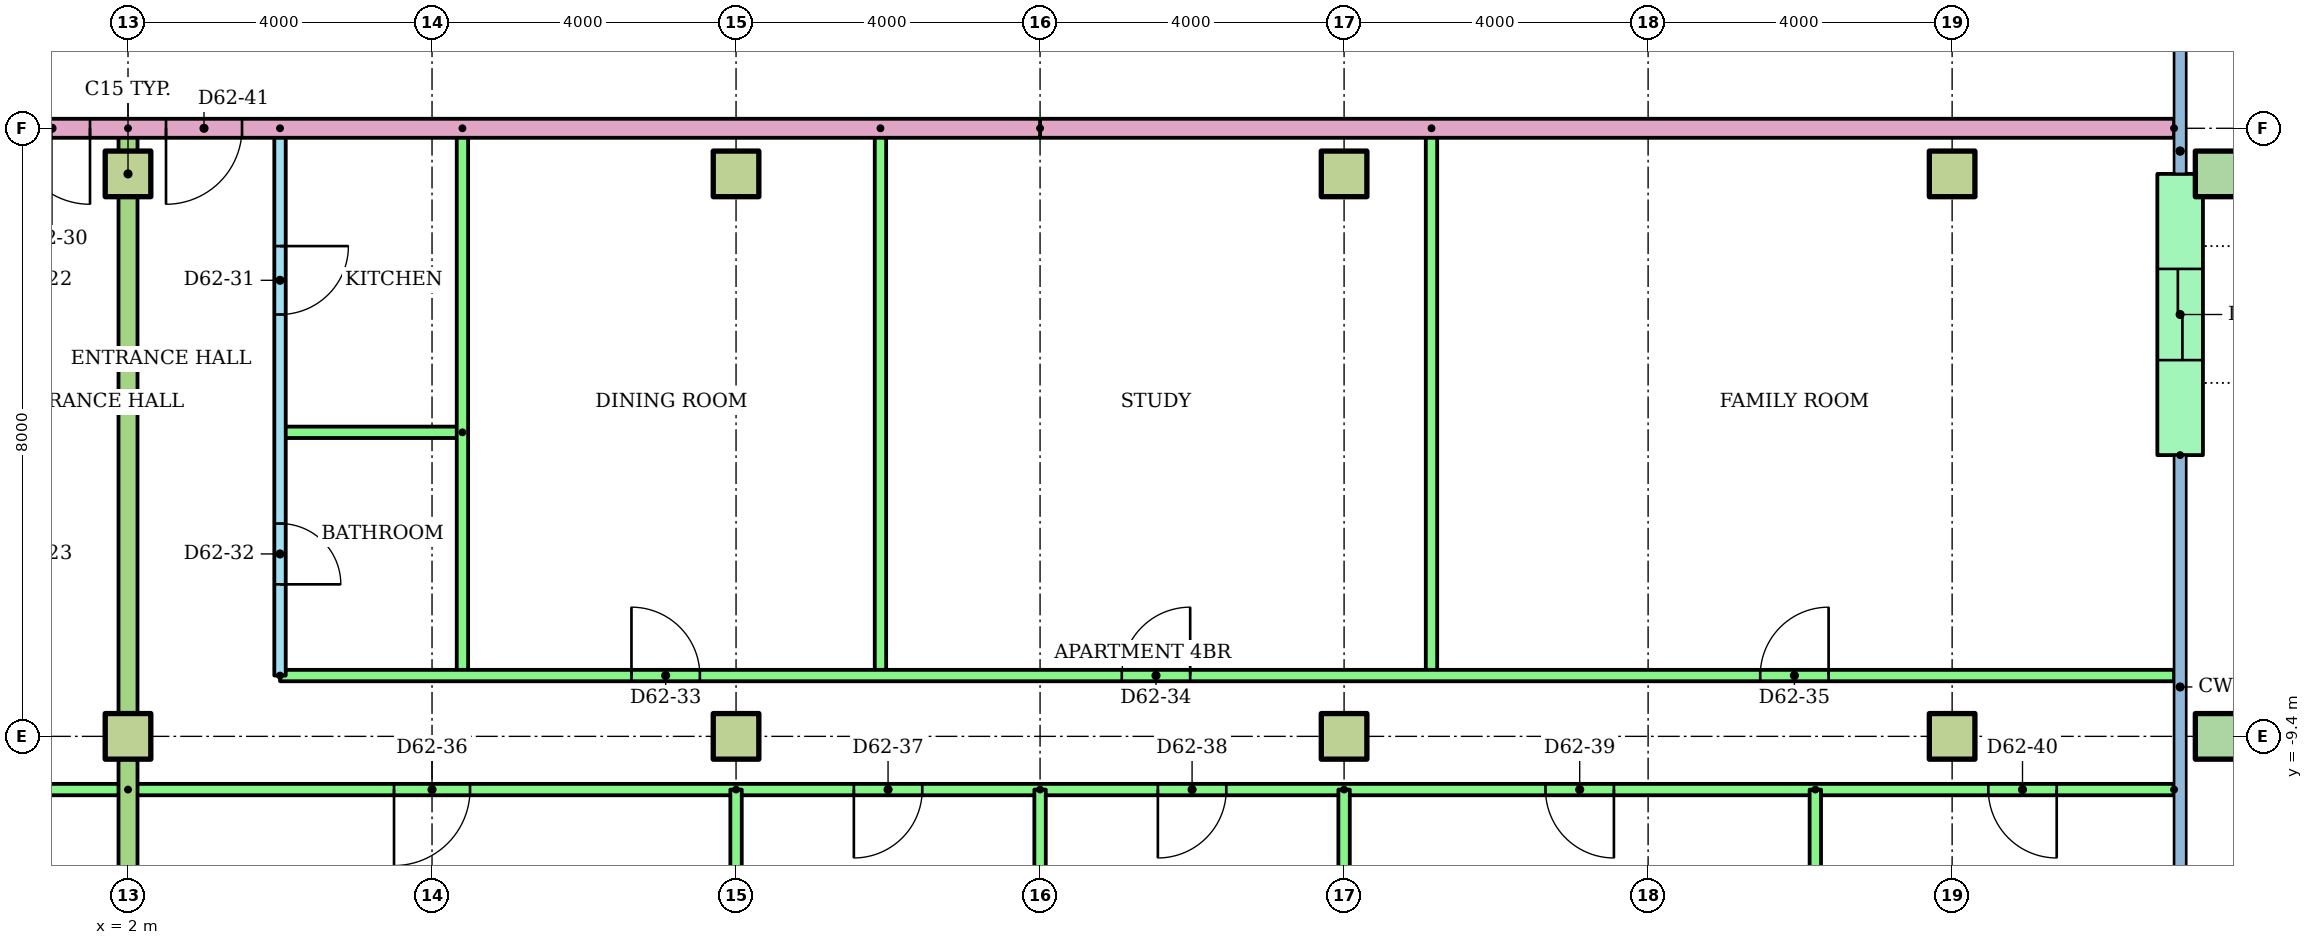
"""IFC4 building model, lengths in metres.
Left out: names, types, materials, properties, quantities, classifications, styles, units other than length and angle.
Written with IfcOpenShell. Run it as: python <this file> out.ifc"""

import sys

from ifc_helpers import new_model, si_unit, direction, frame, frame_2d, origin, origin_2d, place, context, subcontext, project, spatial, rectangle, hollow_rectangle, extrude, element, fill, save


model = new_model("IFC4")
c1 = context("Model", 3, precision=1e-05, world=origin(), true_north=direction((0.0, 1.0)))
c2 = subcontext(c1, "Body", "Model", "MODEL_VIEW")
j1 = project(units=[si_unit("LENGTHUNIT", "METRE"), si_unit("PLANEANGLEUNIT", "RADIAN")], contexts=[c1])
p1 = place(None, origin())
s1 = spatial("IfcSite", under=j1, at=p1, CompositionType="ELEMENT")
p2 = place(p1, origin())
s2 = spatial("IfcBuilding", under=s1, at=p2, CompositionType="ELEMENT")
p3 = place(p2, frame((0.0, 0.0, 236.4)))
s3 = spatial("IfcBuildingStorey", under=s2, at=p3, CompositionType="ELEMENT", Elevation=236.4)
for number, where in (
    (1, (2.0, -9.4, 0.0)),
    (2, (10.0, -9.4, 0.0)),
    (3, (18.0, -9.4, 0.0)),
    (4, (26.0, -9.4, 0.0)),
):
    element("IfcColumn", number, at=place(p3, frame(where)), inside=s3, PredefinedType="COLUMN", context=c2, shape_type="SweptSolid", body=[
        extrude(rectangle(XDim=0.6, YDim=0.6, at=origin_2d()), origin(), (0.0, 0.0, 1.0), 3.2),
    ])
p4 = place(p3, frame((29.5, -9.4, 0.0)))
e5 = element("IfcColumn", 5, at=p4, inside=s3, PredefinedType="COLUMN", context=c2, shape_type="SweptSolid", body=[
    extrude(hollow_rectangle(XDim=0.6, YDim=0.6, WallThickness=0.03, at=origin_2d()), origin(), (0.0, 0.0, 1.0), 3.2),
])
for number, where in (
    (6, (2.0, -2.0, 0.0)),
    (7, (10.0, -2.0, 0.0)),
    (8, (18.0, -2.0, 0.0)),
    (9, (26.0, -2.0, 0.0)),
):
    element("IfcColumn", number, at=place(p3, frame(where)), inside=s3, PredefinedType="COLUMN", context=c2, shape_type="SweptSolid", body=[
        extrude(rectangle(XDim=0.6, YDim=0.6, at=origin_2d()), origin(), (0.0, 0.0, 1.0), 3.2),
    ])
p5 = place(p3, frame((29.5, -2.0, 0.0)))
e10 = element("IfcColumn", 10, at=p5, inside=s3, PredefinedType="COLUMN", context=c2, shape_type="SweptSolid", body=[
    extrude(hollow_rectangle(XDim=0.6, YDim=0.6, WallThickness=0.03, at=origin_2d()), origin(), (0.0, 0.0, 1.0), 3.2),
])
p6 = place(p3, frame((29.0, -5.7, 0.0), z_axis=(0.0, 0.0, 1.0), x_axis=(0.0, 1.0, 0.0)))
e11 = element("IfcWall", 11, at=p6, inside=s3, PredefinedType="STANDARD", context=c2, shape_type="SweptSolid", body=[
    extrude(rectangle(XDim=3.7, YDim=0.6, at=frame_2d((1.85, 0.0))), origin(), (0.0, 0.0, 1.0), 2.8),
])
p7 = place(p6, frame((1.25, 0.0, 0.0)))
e12 = element("IfcOpeningElement", 12, at=p7, cuts=e11, PredefinedType="OPENING", context=c2, shape_type="SweptSolid", body=[
    extrude(rectangle(XDim=1.2, YDim=2.1, at=frame_2d((0.6, 1.05))), frame((0.0, 0.31, 0.0), z_axis=(0.0, -1.0, 0.0), x_axis=(1.0, 0.0, 0.0)), (0.0, 0.0, 1.0), 0.62),
])
p8 = place(p3, frame((2.0, -10.1, 0.0), z_axis=(0.0, 0.0, 1.0), x_axis=(-1.0, 0.0, 0.0)))
e13 = element("IfcWall", 13, at=p8, inside=s3, PredefinedType="PARTITIONING", context=c2, shape_type="SweptSolid", body=[
    extrude(rectangle(XDim=16.0, YDim=0.15, at=frame_2d((8.0, 0.0))), origin(), (0.0, 0.0, 1.0), 2.4),
])
p9 = place(p8, frame((13.55, 0.0, 0.0)))
e14 = element("IfcOpeningElement", 14, at=p9, cuts=e13, PredefinedType="OPENING", context=c2, shape_type="SweptSolid", body=[
    extrude(rectangle(XDim=0.9, YDim=2.1, at=frame_2d((0.45, 1.05))), frame((0.0, 0.085, 0.0), z_axis=(0.0, -1.0, 0.0), x_axis=(1.0, 0.0, 0.0)), (0.0, 0.0, 1.0), 0.17),
])
p10 = place(p8, frame((9.55, 0.0, 0.0)))
e15 = element("IfcOpeningElement", 15, at=p10, cuts=e13, PredefinedType="OPENING", context=c2, shape_type="SweptSolid", body=[
    extrude(rectangle(XDim=0.9, YDim=2.1, at=frame_2d((0.45, 1.05))), frame((0.0, 0.085, 0.0), z_axis=(0.0, -1.0, 0.0), x_axis=(1.0, 0.0, 0.0)), (0.0, 0.0, 1.0), 0.17),
])
p11 = place(p8, frame((3.5, 0.0, 0.0)))
e16 = element("IfcOpeningElement", 16, at=p11, cuts=e13, PredefinedType="OPENING", context=c2, shape_type="SweptSolid", body=[
    extrude(rectangle(XDim=1.0, YDim=2.1, at=frame_2d((0.5, 1.05))), frame((0.0, 0.085, 0.0), z_axis=(0.0, -1.0, 0.0), x_axis=(1.0, 0.0, 0.0)), (0.0, 0.0, 1.0), 0.17),
])
p12 = place(p3, frame((4.0, -1.4, 0.0), z_axis=(0.0, 0.0, 1.0), x_axis=(0.0, -1.0, 0.0)))
e17 = element("IfcWall", 17, at=p12, inside=s3, PredefinedType="PARTITIONING", context=c2, shape_type="SweptSolid", body=[
    extrude(rectangle(XDim=7.2, YDim=0.15, at=frame_2d((3.6, 0.0))), origin(), (0.0, 0.0, 1.0), 2.4),
])
p13 = place(p12, frame((1.55, 0.0, 0.0)))
e18 = element("IfcOpeningElement", 18, at=p13, cuts=e17, PredefinedType="OPENING", context=c2, shape_type="SweptSolid", body=[
    extrude(rectangle(XDim=0.9, YDim=2.1, at=frame_2d((0.45, 1.05))), frame((0.0, 0.085, 0.0), z_axis=(0.0, -1.0, 0.0), x_axis=(1.0, 0.0, 0.0)), (0.0, 0.0, 1.0), 0.17),
])
p14 = place(p12, frame((5.2, 0.0, 0.0)))
e19 = element("IfcOpeningElement", 19, at=p14, cuts=e17, PredefinedType="OPENING", context=c2, shape_type="SweptSolid", body=[
    extrude(rectangle(XDim=0.8, YDim=2.1, at=frame_2d((0.4, 1.05))), frame((0.0, 0.085, 0.0), z_axis=(0.0, -1.0, 0.0), x_axis=(1.0, 0.0, 0.0)), (0.0, 0.0, 1.0), 0.17),
])
p15 = place(p3, frame((6.4, -5.4, 0.0), z_axis=(0.0, 0.0, 1.0), x_axis=(-1.0, 0.0, 0.0)))
e20 = element("IfcWall", 20, at=p15, inside=s3, PredefinedType="PARTITIONING", context=c2, shape_type="SweptSolid", body=[
    extrude(rectangle(XDim=2.4, YDim=0.15, at=frame_2d((1.2, 0.0))), origin(), (0.0, 0.0, 1.0), 2.4),
])
for number, where, z_axis, x_axis in (
    (21, (6.4, -1.4, 0.0), (0.0, 0.0, 1.0), (0.0, -1.0, 0.0)),
    (22, (11.9, -1.4, 0.0), (0.0, 0.0, 1.0), (0.0, -1.0, 0.0)),
    (23, (19.15, -1.4, 0.0), (0.0, 0.0, 1.0), (0.0, -1.0, 0.0)),
):
    element("IfcWall", number, at=place(p3, frame(where, z_axis=z_axis, x_axis=x_axis)), inside=s3, PredefinedType="PARTITIONING", context=c2, shape_type="SweptSolid", body=[
        extrude(rectangle(XDim=7.2, YDim=0.15, at=frame_2d((3.6, 0.0))), origin(), (0.0, 0.0, 1.0), 2.4),
    ])
p16 = place(p3, frame((4.0, -8.6, 0.0)))
e24 = element("IfcWall", 24, at=p16, inside=s3, PredefinedType="PARTITIONING", context=c2, shape_type="SweptSolid", body=[
    extrude(rectangle(XDim=24.92, YDim=0.15, at=frame_2d((12.46, 0.0))), origin(), (0.0, 0.0, 1.0), 2.4),
])
p17 = place(p16, frame((4.624, 0.0, 0.0)))
e25 = element("IfcOpeningElement", 25, at=p17, cuts=e24, PredefinedType="OPENING", context=c2, shape_type="SweptSolid", body=[
    extrude(rectangle(XDim=0.9, YDim=2.1, at=frame_2d((0.45, 1.05))), frame((0.0, 0.085, 0.0), z_axis=(0.0, -1.0, 0.0), x_axis=(1.0, 0.0, 0.0)), (0.0, 0.0, 1.0), 0.17),
])
p18 = place(p16, frame((11.075, 0.0, 0.0)))
e26 = element("IfcOpeningElement", 26, at=p18, cuts=e24, PredefinedType="OPENING", context=c2, shape_type="SweptSolid", body=[
    extrude(rectangle(XDim=0.9, YDim=2.1, at=frame_2d((0.45, 1.05))), frame((0.0, 0.085, 0.0), z_axis=(0.0, -1.0, 0.0), x_axis=(1.0, 0.0, 0.0)), (0.0, 0.0, 1.0), 0.17),
])
p19 = place(p16, frame((19.475, 0.0, 0.0)))
e27 = element("IfcOpeningElement", 27, at=p19, cuts=e24, PredefinedType="OPENING", context=c2, shape_type="SweptSolid", body=[
    extrude(rectangle(XDim=0.9, YDim=2.1, at=frame_2d((0.45, 1.05))), frame((0.0, 0.085, 0.0), z_axis=(0.0, -1.0, 0.0), x_axis=(1.0, 0.0, 0.0)), (0.0, 0.0, 1.0), 0.17),
])
p20 = place(p3, frame((28.92, -10.1, 0.0), z_axis=(0.0, 0.0, 1.0), x_axis=(-1.0, 0.0, 0.0)))
e28 = element("IfcWall", 28, at=p20, inside=s3, PredefinedType="PARTITIONING", context=c2, shape_type="SweptSolid", body=[
    extrude(rectangle(XDim=26.92, YDim=0.15, at=frame_2d((13.46, 0.0))), origin(), (0.0, 0.0, 1.0), 2.4),
])
p21 = place(p20, frame((22.42, 0.0, 0.0)))
e29 = element("IfcOpeningElement", 29, at=p21, cuts=e28, PredefinedType="OPENING", context=c2, shape_type="SweptSolid", body=[
    extrude(rectangle(XDim=1.0, YDim=2.1, at=frame_2d((0.5, 1.05))), frame((0.0, 0.085, 0.0), z_axis=(0.0, -1.0, 0.0), x_axis=(1.0, 0.0, 0.0)), (0.0, 0.0, 1.0), 0.17),
])
p22 = place(p20, frame((16.47, 0.0, 0.0)))
e30 = element("IfcOpeningElement", 30, at=p22, cuts=e28, PredefinedType="OPENING", context=c2, shape_type="SweptSolid", body=[
    extrude(rectangle(XDim=0.9, YDim=2.1, at=frame_2d((0.45, 1.05))), frame((0.0, 0.085, 0.0), z_axis=(0.0, -1.0, 0.0), x_axis=(1.0, 0.0, 0.0)), (0.0, 0.0, 1.0), 0.17),
])
p23 = place(p20, frame((12.47, 0.0, 0.0)))
e31 = element("IfcOpeningElement", 31, at=p23, cuts=e28, PredefinedType="OPENING", context=c2, shape_type="SweptSolid", body=[
    extrude(rectangle(XDim=0.9, YDim=2.1, at=frame_2d((0.45, 1.05))), frame((0.0, 0.085, 0.0), z_axis=(0.0, -1.0, 0.0), x_axis=(1.0, 0.0, 0.0)), (0.0, 0.0, 1.0), 0.17),
])
p24 = place(p20, frame((7.37, 0.0, 0.0)))
e32 = element("IfcOpeningElement", 32, at=p24, cuts=e28, PredefinedType="OPENING", context=c2, shape_type="SweptSolid", body=[
    extrude(rectangle(XDim=0.9, YDim=2.1, at=frame_2d((0.45, 1.05))), frame((0.0, 0.085, 0.0), z_axis=(0.0, -1.0, 0.0), x_axis=(1.0, 0.0, 0.0)), (0.0, 0.0, 1.0), 0.17),
])
p25 = place(p20, frame((1.544, 0.0, 0.0)))
e33 = element("IfcOpeningElement", 33, at=p25, cuts=e28, PredefinedType="OPENING", context=c2, shape_type="SweptSolid", body=[
    extrude(rectangle(XDim=0.9, YDim=2.1, at=frame_2d((0.45, 1.05))), frame((0.0, 0.085, 0.0), z_axis=(0.0, -1.0, 0.0), x_axis=(1.0, 0.0, 0.0)), (0.0, 0.0, 1.0), 0.17),
])
p26 = place(p3, frame((10.0, -10.1, 0.0), z_axis=(0.0, 0.0, 1.0), x_axis=(0.0, -1.0, 0.0)))
e34 = element("IfcWall", 34, at=p26, inside=s3, PredefinedType="PARTITIONING", context=c2, shape_type="SweptSolid", body=[
    extrude(rectangle(XDim=6.41, YDim=0.15, at=frame_2d((3.205, 0.0))), origin(), (0.0, 0.0, 1.0), 2.4),
])
p27 = place(p3, frame((14.0, -10.1, 0.0), z_axis=(0.0, 0.0, 1.0), x_axis=(0.0, -1.0, 0.0)))
e35 = element("IfcWall", 35, at=p27, inside=s3, PredefinedType="PARTITIONING", context=c2, shape_type="SweptSolid", body=[
    extrude(rectangle(XDim=6.421, YDim=0.15, at=frame_2d((3.21, 0.0))), origin(), (0.0, 0.0, 1.0), 2.4),
])
p28 = place(p3, frame((18.0, -10.1, 0.0), z_axis=(0.0, 0.0, 1.0), x_axis=(0.0, -1.0, 0.0)))
e36 = element("IfcWall", 36, at=p28, inside=s3, PredefinedType="PARTITIONING", context=c2, shape_type="SweptSolid", body=[
    extrude(rectangle(XDim=6.41, YDim=0.15, at=frame_2d((3.205, 0.0))), origin(), (0.0, 0.0, 1.0), 2.4),
])
p29 = place(p3, frame((24.2, -10.1, 0.0), z_axis=(0.0, 0.0, 1.0), x_axis=(0.0, -1.0, 0.0)))
e37 = element("IfcWall", 37, at=p29, inside=s3, PredefinedType="PARTITIONING", context=c2, shape_type="SweptSolid", body=[
    extrude(rectangle(XDim=4.62, YDim=0.15, at=frame_2d((2.31, 0.0))), origin(), (0.0, 0.0, 1.0), 2.4),
])
p30 = place(p3, frame((2.0, -1.4, 0.0), z_axis=(0.0, 0.0, 1.0), x_axis=(0.0, -1.0, 0.0)))
e38 = element("IfcWall", 38, at=p30, inside=s3, PredefinedType="PARTITIONING", context=c2, shape_type="SweptSolid", body=[
    extrude(rectangle(XDim=15.11, YDim=0.25, at=frame_2d((7.555, 0.0))), origin(), (0.0, 0.0, 1.0), 2.4),
])
p31 = place(p3, frame((28.92, -1.4, 0.0), z_axis=(0.0, 0.0, 1.0), x_axis=(-1.0, 0.0, 0.0)))
e39 = element("IfcWall", 39, at=p31, inside=s3, PredefinedType="PARTITIONING", context=c2, shape_type="SweptSolid", body=[
    extrude(rectangle(XDim=14.92, YDim=0.25, at=frame_2d((7.46, 0.0))), origin(), (0.0, 0.0, 1.0), 2.4),
])
p32 = place(p3, frame((14.0, -1.4, 0.0), z_axis=(0.0, 0.0, 1.0), x_axis=(-1.0, 0.0, 0.0)))
e40 = element("IfcWall", 40, at=p32, inside=s3, PredefinedType="PARTITIONING", context=c2, shape_type="SweptSolid", body=[
    extrude(rectangle(XDim=28.0, YDim=0.25, at=frame_2d((14.0, 0.0))), origin(), (0.0, 0.0, 1.0), 2.4),
])
p33 = place(p32, frame((12.5, 0.0, 0.0)))
e41 = element("IfcOpeningElement", 41, at=p33, cuts=e40, PredefinedType="OPENING", context=c2, shape_type="SweptSolid", body=[
    extrude(rectangle(XDim=1.0, YDim=2.1, at=frame_2d((0.5, 1.05))), frame((0.0, 0.135, 0.0), z_axis=(0.0, -1.0, 0.0), x_axis=(1.0, 0.0, 0.0)), (0.0, 0.0, 1.0), 0.27),
])
p34 = place(p32, frame((10.5, 0.0, 0.0)))
e42 = element("IfcOpeningElement", 42, at=p34, cuts=e40, PredefinedType="OPENING", context=c2, shape_type="SweptSolid", body=[
    extrude(rectangle(XDim=1.0, YDim=2.1, at=frame_2d((0.5, 1.05))), frame((0.0, 0.135, 0.0), z_axis=(0.0, -1.0, 0.0), x_axis=(1.0, 0.0, 0.0)), (0.0, 0.0, 1.0), 0.27),
])
p35 = place(p33, origin())
e43 = element("IfcDoor", 43, at=p35, inside=s3, OperationType="SINGLE_SWING_LEFT", PredefinedType="DOOR", context=c2, shape_type="SweptSolid", body=[
    extrude(rectangle(XDim=1.0, YDim=2.1, at=frame_2d((0.5, 1.05))), frame((0.0, 0.025, 0.0), z_axis=(0.0, -1.0, 0.0), x_axis=(1.0, 0.0, 0.0)), (0.0, 0.0, 1.0), 0.05),
])
fill(e41, e43)
p36 = place(p13, origin())
e44 = element("IfcDoor", 44, at=p36, inside=s3, OperationType="SINGLE_SWING_LEFT", PredefinedType="DOOR", context=c2, shape_type="SweptSolid", body=[
    extrude(rectangle(XDim=0.9, YDim=2.1, at=frame_2d((0.45, 1.05))), frame((0.0, 0.025, 0.0), z_axis=(0.0, -1.0, 0.0), x_axis=(1.0, 0.0, 0.0)), (0.0, 0.0, 1.0), 0.05),
])
fill(e18, e44)
p37 = place(p14, origin())
e45 = element("IfcDoor", 45, at=p37, inside=s3, OperationType="SINGLE_SWING_RIGHT", PredefinedType="DOOR", context=c2, shape_type="SweptSolid", body=[
    extrude(rectangle(XDim=0.8, YDim=2.1, at=frame_2d((0.4, 1.05))), frame((0.0, 0.025, 0.0), z_axis=(0.0, -1.0, 0.0), x_axis=(1.0, 0.0, 0.0)), (0.0, 0.0, 1.0), 0.05),
])
fill(e19, e45)
p38 = place(p17, origin())
e46 = element("IfcDoor", 46, at=p38, inside=s3, OperationType="SINGLE_SWING_LEFT", PredefinedType="DOOR", context=c2, shape_type="SweptSolid", body=[
    extrude(rectangle(XDim=0.9, YDim=2.1, at=frame_2d((0.45, 1.05))), frame((0.0, 0.025, 0.0), z_axis=(0.0, -1.0, 0.0), x_axis=(1.0, 0.0, 0.0)), (0.0, 0.0, 1.0), 0.05),
])
fill(e25, e46)
p39 = place(p18, origin())
e47 = element("IfcDoor", 47, at=p39, inside=s3, OperationType="SINGLE_SWING_RIGHT", PredefinedType="DOOR", context=c2, shape_type="SweptSolid", body=[
    extrude(rectangle(XDim=0.9, YDim=2.1, at=frame_2d((0.45, 1.05))), frame((0.0, 0.025, 0.0), z_axis=(0.0, -1.0, 0.0), x_axis=(1.0, 0.0, 0.0)), (0.0, 0.0, 1.0), 0.05),
])
fill(e26, e47)
p40 = place(p19, origin())
e48 = element("IfcDoor", 48, at=p40, inside=s3, OperationType="SINGLE_SWING_RIGHT", PredefinedType="DOOR", context=c2, shape_type="SweptSolid", body=[
    extrude(rectangle(XDim=0.9, YDim=2.1, at=frame_2d((0.45, 1.05))), frame((0.0, 0.025, 0.0), z_axis=(0.0, -1.0, 0.0), x_axis=(1.0, 0.0, 0.0)), (0.0, 0.0, 1.0), 0.05),
])
fill(e27, e48)
p41 = place(p21, origin())
e49 = element("IfcDoor", 49, at=p41, inside=s3, OperationType="SINGLE_SWING_RIGHT", PredefinedType="DOOR", context=c2, shape_type="SweptSolid", body=[
    extrude(rectangle(XDim=1.0, YDim=2.1, at=frame_2d((0.5, 1.05))), frame((0.0, 0.025, 0.0), z_axis=(0.0, -1.0, 0.0), x_axis=(1.0, 0.0, 0.0)), (0.0, 0.0, 1.0), 0.05),
])
fill(e29, e49)
p42 = place(p22, origin())
e50 = element("IfcDoor", 50, at=p42, inside=s3, OperationType="SINGLE_SWING_RIGHT", PredefinedType="DOOR", context=c2, shape_type="SweptSolid", body=[
    extrude(rectangle(XDim=0.9, YDim=2.1, at=frame_2d((0.45, 1.05))), frame((0.0, 0.025, 0.0), z_axis=(0.0, -1.0, 0.0), x_axis=(1.0, 0.0, 0.0)), (0.0, 0.0, 1.0), 0.05),
])
fill(e30, e50)
p43 = place(p23, origin())
e51 = element("IfcDoor", 51, at=p43, inside=s3, OperationType="SINGLE_SWING_RIGHT", PredefinedType="DOOR", context=c2, shape_type="SweptSolid", body=[
    extrude(rectangle(XDim=0.9, YDim=2.1, at=frame_2d((0.45, 1.05))), frame((0.0, 0.025, 0.0), z_axis=(0.0, -1.0, 0.0), x_axis=(1.0, 0.0, 0.0)), (0.0, 0.0, 1.0), 0.05),
])
fill(e31, e51)
p44 = place(p24, origin())
e52 = element("IfcDoor", 52, at=p44, inside=s3, OperationType="SINGLE_SWING_LEFT", PredefinedType="DOOR", context=c2, shape_type="SweptSolid", body=[
    extrude(rectangle(XDim=0.9, YDim=2.1, at=frame_2d((0.45, 1.05))), frame((0.0, 0.025, 0.0), z_axis=(0.0, -1.0, 0.0), x_axis=(1.0, 0.0, 0.0)), (0.0, 0.0, 1.0), 0.05),
])
fill(e32, e52)
p45 = place(p25, origin())
e53 = element("IfcDoor", 53, at=p45, inside=s3, OperationType="SINGLE_SWING_LEFT", PredefinedType="DOOR", context=c2, shape_type="SweptSolid", body=[
    extrude(rectangle(XDim=0.9, YDim=2.1, at=frame_2d((0.45, 1.05))), frame((0.0, 0.025, 0.0), z_axis=(0.0, -1.0, 0.0), x_axis=(1.0, 0.0, 0.0)), (0.0, 0.0, 1.0), 0.05),
])
fill(e33, e53)
p46 = place(p34, origin())
e54 = element("IfcDoor", 54, at=p46, inside=s3, OperationType="SINGLE_SWING_RIGHT", PredefinedType="DOOR", context=c2, shape_type="SweptSolid", body=[
    extrude(rectangle(XDim=1.0, YDim=2.1, at=frame_2d((0.5, 1.05))), frame((0.0, 0.025, 0.0), z_axis=(0.0, -1.0, 0.0), x_axis=(1.0, 0.0, 0.0)), (0.0, 0.0, 1.0), 0.05),
])
fill(e42, e54)
p47 = place(p7, origin())
e55 = element("IfcDoor", 55, at=p47, inside=s3, OperationType="SLIDING_TO_LEFT", PredefinedType="DOOR", context=c2, shape_type="SweptSolid", body=[
    extrude(rectangle(XDim=1.2, YDim=2.1, at=frame_2d((0.6, 1.05))), frame((0.0, 0.025, 0.0), z_axis=(0.0, -1.0, 0.0), x_axis=(1.0, 0.0, 0.0)), (0.0, 0.0, 1.0), 0.05),
])
fill(e12, e55)
save(model, sys.argv[1])
